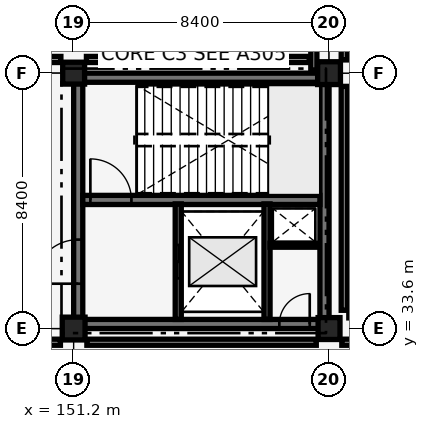
"""IFC4 building model, lengths in metres.
Left out: names, types, materials, properties, quantities, classifications, styles, units other than length and angle.
Written with IfcOpenShell. Run it as: python <this file> out.ifc"""

import sys

from ifc_helpers import new_model, si_unit, direction, frame, frame_2d, origin, origin_2d, place, context, subcontext, project, spatial, rectangle, extrude, element, fill, save


model = new_model("IFC4")
c1 = context("Model", 3, precision=1e-05, world=origin(), true_north=direction((0.0, 1.0)))
c2 = subcontext(c1, "Body", "Model", "MODEL_VIEW")
j1 = project(units=[si_unit("LENGTHUNIT", "METRE"), si_unit("PLANEANGLEUNIT", "RADIAN")], contexts=[c1])
p1 = place(None, origin())
s1 = spatial("IfcSite", under=j1, at=p1, CompositionType="ELEMENT")
p2 = place(p1, origin())
s2 = spatial("IfcBuilding", under=s1, at=p2, CompositionType="ELEMENT")
p3 = place(p2, origin())
s3 = spatial("IfcBuildingStorey", under=s2, at=p3, CompositionType="ELEMENT", Elevation=0.0)
p4 = place(p3, frame((151.35, 33.75, 0.0), z_axis=(0.0, 0.0, 1.0), x_axis=(1.0, 0.0, 0.0)))
e1 = element("IfcWall", 1, at=p4, inside=s3, PredefinedType="SHEAR", context=c2, shape_type="SweptSolid", body=[
    extrude(rectangle(XDim=8.1, YDim=0.3, at=frame_2d((4.05, 0.0))), origin(), (0.0, 0.0, 1.0), 5.14),
])
p5 = place(p4, frame((6.615, 0.0, 0.0)))
e2 = element("IfcOpeningElement", 2, at=p5, cuts=e1, PredefinedType="OPENING", context=c2, shape_type="SweptSolid", body=[
    extrude(rectangle(XDim=1.0, YDim=2.15, at=frame_2d((0.5, 1.075))), frame((0.0, 0.16, 0.0), z_axis=(0.0, -1.0, 0.0), x_axis=(1.0, 0.0, 0.0)), (0.0, 0.0, 1.0), 0.32),
])
p6 = place(p3, frame((151.35, 41.85, 0.0), z_axis=(0.0, 0.0, 1.0), x_axis=(1.0, 0.0, 0.0)))
e3 = element("IfcWall", 3, at=p6, inside=s3, PredefinedType="SHEAR", context=c2, shape_type="SweptSolid", body=[
    extrude(rectangle(XDim=8.1, YDim=0.3, at=frame_2d((4.05, 0.0))), origin(), (0.0, 0.0, 1.0), 5.14),
])
p7 = place(p3, frame((151.35, 33.75, 0.0), z_axis=(0.0, 0.0, 1.0), x_axis=(0.0, 1.0, 0.0)))
e4 = element("IfcWall", 4, at=p7, inside=s3, PredefinedType="SHEAR", context=c2, shape_type="SweptSolid", body=[
    extrude(rectangle(XDim=8.1, YDim=0.3, at=frame_2d((4.05, 0.0))), origin(), (0.0, 0.0, 1.0), 5.14),
])
p8 = place(p7, frame((1.325, 0.0, 0.0)))
e5 = element("IfcOpeningElement", 5, at=p8, cuts=e4, PredefinedType="OPENING", context=c2, shape_type="SweptSolid", body=[
    extrude(rectangle(XDim=1.45, YDim=2.15, at=frame_2d((0.725, 1.075))), frame((0.0, 0.16, 0.0), z_axis=(0.0, -1.0, 0.0), x_axis=(1.0, 0.0, 0.0)), (0.0, 0.0, 1.0), 0.32),
])
p9 = place(p3, frame((159.45, 33.75, 0.0), z_axis=(0.0, 0.0, 1.0), x_axis=(0.0, 1.0, 0.0)))
e6 = element("IfcWall", 6, at=p9, inside=s3, PredefinedType="SHEAR", context=c2, shape_type="SweptSolid", body=[
    extrude(rectangle(XDim=8.1, YDim=0.3, at=frame_2d((4.05, 0.0))), origin(), (0.0, 0.0, 1.0), 5.14),
])
p10 = place(p3, frame((151.5, 37.83, 0.0), z_axis=(0.0, 0.0, 1.0), x_axis=(1.0, 0.0, 0.0)))
e7 = element("IfcWall", 7, at=p10, inside=s3, PredefinedType="SHEAR", context=c2, shape_type="SweptSolid", body=[
    extrude(rectangle(XDim=7.8, YDim=0.3, at=frame_2d((3.9, 0.0))), origin(), (0.0, 0.0, 1.0), 5.14),
])
p11 = place(p10, frame((0.25, 0.0, 0.0)))
e8 = element("IfcOpeningElement", 8, at=p11, cuts=e7, PredefinedType="OPENING", context=c2, shape_type="SweptSolid", body=[
    extrude(rectangle(XDim=1.35, YDim=2.15, at=frame_2d((0.675, 1.075))), frame((0.0, 0.16, 0.0), z_axis=(0.0, -1.0, 0.0), x_axis=(1.0, 0.0, 0.0)), (0.0, 0.0, 1.0), 0.32),
])
p12 = place(p3, frame((151.2, 33.6, 0.0), z_axis=(0.0, 0.0, 1.0), x_axis=(1.0, 0.0, 0.0)))
e9 = element("IfcColumn", 9, at=p12, inside=s3, PredefinedType="COLUMN", context=c2, shape_type="SweptSolid", body=[
    extrude(rectangle(XDim=0.75, YDim=0.75, at=origin_2d()), origin(), (0.0, 0.0, 1.0), 5.14),
])
for number, where, z_axis, x_axis in (
    (10, (151.2, 42.0, 0.0), (0.0, 0.0, 1.0), (1.0, 0.0, 0.0)),
    (11, (159.6, 33.6, 0.0), (0.0, 0.0, 1.0), (1.0, 0.0, 0.0)),
):
    element("IfcColumn", number, at=place(p3, frame(where, z_axis=z_axis, x_axis=x_axis)), inside=s3, PredefinedType="COLUMN", context=c2, shape_type="SweptSolid", body=[
        extrude(rectangle(XDim=0.72, YDim=0.72, at=origin_2d()), origin(), (0.0, 0.0, 1.0), 5.14),
    ])
p13 = place(p3, frame((159.6, 42.0, 0.0), z_axis=(0.0, 0.0, 1.0), x_axis=(1.0, 0.0, 0.0)))
e12 = element("IfcColumn", 12, at=p13, inside=s3, PredefinedType="COLUMN", context=c2, shape_type="SweptSolid", body=[
    extrude(rectangle(XDim=0.75, YDim=0.75, at=origin_2d()), origin(), (0.0, 0.0, 1.0), 5.14),
])
p14 = place(p3, frame((154.64, 33.9, 0.0), z_axis=(0.0, 0.0, 1.0), x_axis=(0.0, 1.0, 0.0)))
e13 = element("IfcWall", 13, at=p14, inside=s3, PredefinedType="SHEAR", context=c2, shape_type="SweptSolid", body=[
    extrude(rectangle(XDim=3.8, YDim=0.2, at=frame_2d((1.9, 0.0))), origin(), (0.0, 0.0, 1.0), 4.36),
])
p15 = place(p14, frame((1.35, 0.0, 0.0)))
e14 = element("IfcOpeningElement", 14, at=p15, cuts=e13, PredefinedType="OPENING", context=c2, shape_type="SweptSolid", body=[
    extrude(rectangle(XDim=1.1, YDim=2.15, at=frame_2d((0.55, 1.075))), frame((0.0, 0.11, 0.0), z_axis=(0.0, -1.0, 0.0), x_axis=(1.0, 0.0, 0.0)), (0.0, 0.0, 1.0), 0.22),
])
p16 = place(p3, frame((157.56, 33.9, 0.0), z_axis=(0.0, 0.0, 1.0), x_axis=(0.0, 1.0, 0.0)))
e15 = element("IfcWall", 15, at=p16, inside=s3, PredefinedType="SHEAR", context=c2, shape_type="SweptSolid", body=[
    extrude(rectangle(XDim=3.8, YDim=0.2, at=frame_2d((1.9, 0.0))), origin(), (0.0, 0.0, 1.0), 4.36),
])
p17 = place(p3, frame((157.66, 36.34, 0.0), z_axis=(0.0, 0.0, 1.0), x_axis=(1.0, 0.0, 0.0)))
e16 = element("IfcWall", 16, at=p17, inside=s3, PredefinedType="PARTITIONING", context=c2, shape_type="SweptSolid", body=[
    extrude(rectangle(XDim=1.62, YDim=0.13, at=frame_2d((0.81, 0.0))), origin(), (0.0, 0.0, 1.0), 5.14),
])
for number, where, z_axis, x_axis in (
    (17, (143.22, 33.15, 0.0), (0.0, 0.0, 1.0), (1.0, 0.0, 0.0)),
    (18, (151.635, 33.15, 0.0), (0.0, 0.0, 1.0), (1.0, 0.0, 0.0)),
):
    element("IfcWall", number, at=place(p3, frame(where, z_axis=z_axis, x_axis=x_axis)), inside=s3, PredefinedType="PARTITIONING", context=c2, shape_type="SweptSolid", body=[
        extrude(rectangle(XDim=7.545, YDim=0.2, at=frame_2d((3.772, 0.0))), origin(), (0.0, 0.0, 1.0), 5.14),
    ])
p18 = place(p3, frame((160.02, 33.15, 0.0), z_axis=(0.0, 0.0, 1.0), x_axis=(1.0, 0.0, 0.0)))
e19 = element("IfcWall", 19, at=p18, inside=s3, PredefinedType="PARTITIONING", context=c2, shape_type="SweptSolid", body=[
    extrude(rectangle(XDim=7.43, YDim=0.2, at=frame_2d((3.715, 0.0))), origin(), (0.0, 0.0, 1.0), 5.14),
])
p19 = place(p3, frame((143.235, 42.45, 0.0), z_axis=(0.0, 0.0, 1.0), x_axis=(1.0, 0.0, 0.0)))
e20 = element("IfcWall", 20, at=p19, inside=s3, PredefinedType="PARTITIONING", context=c2, shape_type="SweptSolid", body=[
    extrude(rectangle(XDim=7.545, YDim=0.2, at=frame_2d((3.772, 0.0))), origin(), (0.0, 0.0, 1.0), 5.14),
])
p20 = place(p3, frame((151.62, 42.45, 0.0), z_axis=(0.0, 0.0, 1.0), x_axis=(1.0, 0.0, 0.0)))
e21 = element("IfcWall", 21, at=p20, inside=s3, PredefinedType="PARTITIONING", context=c2, shape_type="SweptSolid", body=[
    extrude(rectangle(XDim=7.33, YDim=0.2, at=frame_2d((3.665, 0.0))), origin(), (0.0, 0.0, 1.0), 5.14),
])
p21 = place(p3, frame((159.1, 42.03, 0.0), z_axis=(0.0, 0.0, 1.0), x_axis=(0.0, 1.0, 0.0)))
e22 = element("IfcWall", 22, at=p21, inside=s3, PredefinedType="PARTITIONING", context=c2, shape_type="SweptSolid", body=[
    extrude(rectangle(XDim=7.95, YDim=0.2, at=frame_2d((3.975, 0.0))), origin(), (0.0, 0.0, 1.0), 4.46),
])
p22 = place(p3, frame((160.25, 34.05, 0.0), z_axis=(0.0, 0.0, 1.0), x_axis=(1.0, 0.0, 0.0)))
e23 = element("IfcWall", 23, at=p22, inside=s3, PredefinedType="PARTITIONING", context=c2, shape_type="SweptSolid", body=[
    extrude(rectangle(XDim=7.2, YDim=0.2, at=frame_2d((3.6, 0.0))), origin(), (0.0, 0.0, 1.0), 5.14),
])
p23 = place(p3, frame((160.1, 34.2, 0.0), z_axis=(0.0, 0.0, 1.0), x_axis=(0.0, 1.0, 0.0)))
e24 = element("IfcWall", 24, at=p23, inside=s3, PredefinedType="PARTITIONING", context=c2, shape_type="SweptSolid", body=[
    extrude(rectangle(XDim=7.365, YDim=0.2, at=frame_2d((3.683, 0.0))), origin(), (0.0, 0.0, 1.0), 4.58),
])
p24 = place(p3, frame((160.1, 42.435, 0.0), z_axis=(0.0, 0.0, 1.0), x_axis=(0.0, 1.0, 0.0)))
e25 = element("IfcWall", 25, at=p24, inside=s3, PredefinedType="PARTITIONING", context=c2, shape_type="SweptSolid", body=[
    extrude(rectangle(XDim=7.545, YDim=0.2, at=frame_2d((3.772, 0.0))), origin(), (0.0, 0.0, 1.0), 4.59),
])
p25 = place(p11, origin())
e26 = element("IfcDoor", 26, at=p25, inside=s3, OperationType="SINGLE_SWING_LEFT", PredefinedType="DOOR", context=c2, shape_type="SweptSolid", body=[
    extrude(rectangle(XDim=1.35, YDim=2.15, at=frame_2d((0.675, 1.075))), frame((0.0, 0.025, 0.0), z_axis=(0.0, -1.0, 0.0), x_axis=(1.0, 0.0, 0.0)), (0.0, 0.0, 1.0), 0.05),
])
fill(e8, e26)
p26 = place(p15, origin())
e27 = element("IfcDoor", 27, at=p26, inside=s3, OperationType="SLIDING_TO_LEFT", PredefinedType="DOOR", context=c2, shape_type="SweptSolid", body=[
    extrude(rectangle(XDim=1.1, YDim=2.15, at=frame_2d((0.55, 1.075))), frame((0.0, 0.025, 0.0), z_axis=(0.0, -1.0, 0.0), x_axis=(1.0, 0.0, 0.0)), (0.0, 0.0, 1.0), 0.05),
])
fill(e14, e27)
p27 = place(p8, origin())
e28 = element("IfcDoor", 28, at=p27, inside=s3, OperationType="DOUBLE_DOOR_SINGLE_SWING", PredefinedType="DOOR", context=c2, shape_type="SweptSolid", body=[
    extrude(rectangle(XDim=1.45, YDim=2.15, at=frame_2d((0.725, 1.075))), frame((0.0, 0.025, 0.0), z_axis=(0.0, -1.0, 0.0), x_axis=(1.0, 0.0, 0.0)), (0.0, 0.0, 1.0), 0.05),
])
fill(e5, e28)
p28 = place(p5, origin())
e29 = element("IfcDoor", 29, at=p28, inside=s3, OperationType="SINGLE_SWING_RIGHT", PredefinedType="DOOR", context=c2, shape_type="SweptSolid", body=[
    extrude(rectangle(XDim=1.0, YDim=2.15, at=frame_2d((0.5, 1.075))), frame((0.0, 0.025, 0.0), z_axis=(0.0, -1.0, 0.0), x_axis=(1.0, 0.0, 0.0)), (0.0, 0.0, 1.0), 0.05),
])
fill(e2, e29)
save(model, sys.argv[1])
